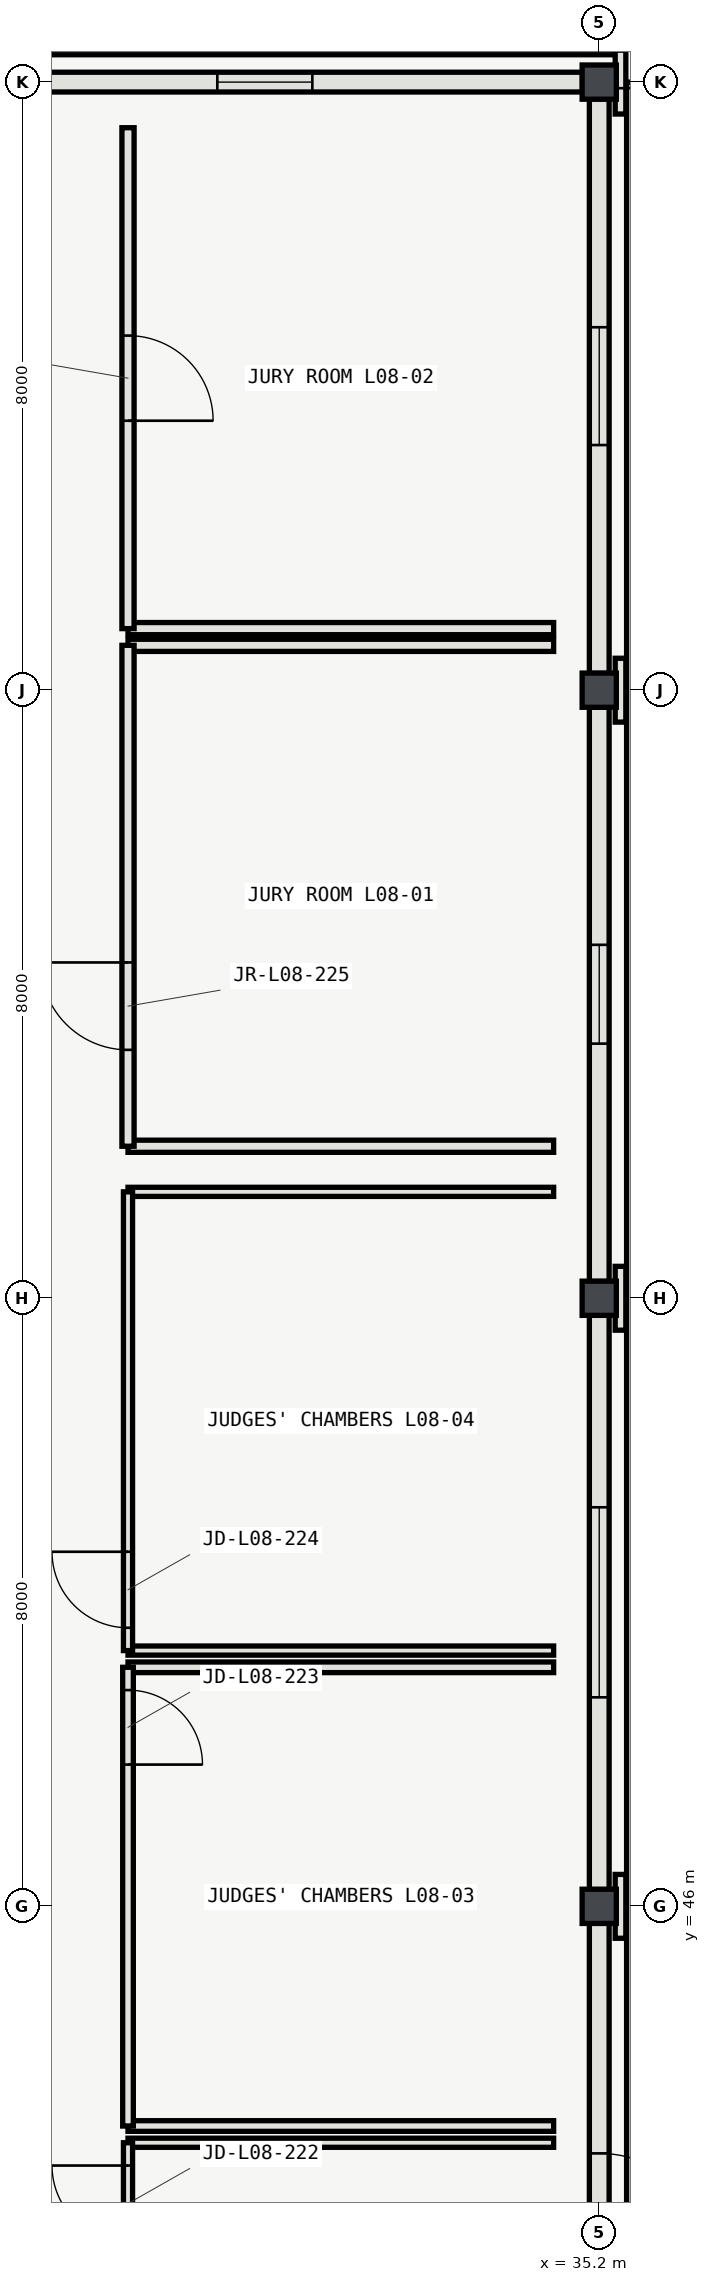
"""IFC4 building model, lengths in metres.
Left out: names, types, materials, properties, quantities, classifications, styles, units other than length and angle.
Written with IfcOpenShell. Run it as: python <this file> out.ifc"""

import sys

from ifc_helpers import new_model, si_unit, direction, frame, frame_2d, origin, origin_2d, place, context, subcontext, project, spatial, rectangle, hollow_rectangle, extrude, element, fill, save


model = new_model("IFC4")
c1 = context("Model", 3, precision=1e-05, world=origin(), true_north=direction((0.0, 1.0)))
c2 = subcontext(c1, "Body", "Model", "MODEL_VIEW")
j1 = project(units=[si_unit("LENGTHUNIT", "METRE"), si_unit("PLANEANGLEUNIT", "RADIAN")], contexts=[c1])
p1 = place(None, origin())
s1 = spatial("IfcSite", under=j1, at=p1, CompositionType="ELEMENT")
p2 = place(p1, origin())
s2 = spatial("IfcBuilding", under=s1, at=p2, CompositionType="ELEMENT")
p3 = place(p2, frame((0.0, 0.0, 37.2)))
s3 = spatial("IfcBuildingStorey", under=s2, at=p3, CompositionType="ELEMENT", Elevation=37.2)
for number, where, z_axis, x_axis in (
    (1, (35.2, 46.0, 0.0), (0.0, 0.0, 1.0), (1.0, 0.0, 0.0)),
    (2, (35.2, 54.0, 0.0), (0.0, 0.0, 1.0), (1.0, 0.0, 0.0)),
    (3, (35.2, 62.0, 0.0), (0.0, 0.0, 1.0), (1.0, 0.0, 0.0)),
    (4, (35.2, 70.0, 0.0), (0.0, 0.0, 1.0), (1.0, 0.0, 0.0)),
):
    element("IfcColumn", number, at=place(p3, frame(where, z_axis=z_axis, x_axis=x_axis)), inside=s3, PredefinedType="COLUMN", context=c2, shape_type="SweptSolid", body=[
        extrude(hollow_rectangle(XDim=0.45, YDim=0.45, WallThickness=0.018, InnerFilletRadius=0.018, OuterFilletRadius=0.036, at=origin_2d()), origin(), (0.0, 0.0, 1.0), 4.2),
    ])
p4 = place(p3, frame((34.979, 70.0, 0.0), z_axis=(0.0, 0.0, 1.0), x_axis=(-1.0, 0.0, 0.0)))
e5 = element("IfcWall", 5, at=p4, inside=s3, PredefinedType="SOLIDWALL", context=c2, shape_type="SweptSolid", body=[
    extrude(rectangle(XDim=8.283, YDim=0.26, at=frame_2d((4.142, 0.0))), origin(), (0.0, 0.0, 1.0), 3.483),
])
p5 = place(p4, frame((3.554, 0.0, 0.95)))
e6 = element("IfcOpeningElement", 6, at=p5, cuts=e5, PredefinedType="OPENING", context=c2, shape_type="SweptSolid", body=[
    extrude(rectangle(XDim=1.25, YDim=1.6, at=frame_2d((0.625, 0.8))), frame((0.0, 0.14, 0.0), z_axis=(0.0, -1.0, 0.0), x_axis=(1.0, 0.0, 0.0)), (0.0, 0.0, 1.0), 0.28),
])
p6 = place(p3, frame((35.2, 38.221, 0.0), z_axis=(0.0, 0.0, 1.0), x_axis=(0.0, 1.0, 0.0)))
e7 = element("IfcWall", 7, at=p6, inside=s3, PredefinedType="SOLIDWALL", context=c2, shape_type="SweptSolid", body=[
    extrude(rectangle(XDim=7.558, YDim=0.26, at=frame_2d((3.779, 0.0))), origin(), (0.0, 0.0, 1.0), 3.483),
])
p7 = place(p6, frame((3.029, 0.0, 0.0)))
e8 = element("IfcOpeningElement", 8, at=p7, cuts=e7, PredefinedType="OPENING", context=c2, shape_type="SweptSolid", body=[
    extrude(rectangle(XDim=1.5, YDim=2.2, at=frame_2d((0.75, 1.1))), frame((0.0, 0.14, 0.0), z_axis=(0.0, -1.0, 0.0), x_axis=(1.0, 0.0, 0.0)), (0.0, 0.0, 1.0), 0.28),
])
p8 = place(p3, frame((35.2, 46.221, 0.0), z_axis=(0.0, 0.0, 1.0), x_axis=(0.0, 1.0, 0.0)))
e9 = element("IfcWall", 9, at=p8, inside=s3, PredefinedType="SOLIDWALL", context=c2, shape_type="SweptSolid", body=[
    extrude(rectangle(XDim=7.558, YDim=0.26, at=frame_2d((3.779, 0.0))), origin(), (0.0, 0.0, 1.0), 3.483),
])
p9 = place(p8, frame((2.529, 0.0, 0.95)))
e10 = element("IfcOpeningElement", 10, at=p9, cuts=e9, PredefinedType="OPENING", context=c2, shape_type="SweptSolid", body=[
    extrude(rectangle(XDim=2.5, YDim=1.6, at=frame_2d((1.25, 0.8))), frame((0.0, 0.14, 0.0), z_axis=(0.0, -1.0, 0.0), x_axis=(1.0, 0.0, 0.0)), (0.0, 0.0, 1.0), 0.28),
])
p10 = place(p3, frame((35.2, 54.221, 0.0), z_axis=(0.0, 0.0, 1.0), x_axis=(0.0, 1.0, 0.0)))
e11 = element("IfcWall", 11, at=p10, inside=s3, PredefinedType="SOLIDWALL", context=c2, shape_type="SweptSolid", body=[
    extrude(rectangle(XDim=7.558, YDim=0.26, at=frame_2d((3.779, 0.0))), origin(), (0.0, 0.0, 1.0), 3.483),
])
p11 = place(p10, frame((3.129, 0.0, 0.95)))
e12 = element("IfcOpeningElement", 12, at=p11, cuts=e11, PredefinedType="OPENING", context=c2, shape_type="SweptSolid", body=[
    extrude(rectangle(XDim=1.3, YDim=1.95, at=frame_2d((0.65, 0.975))), frame((0.0, 0.14, 0.0), z_axis=(0.0, -1.0, 0.0), x_axis=(1.0, 0.0, 0.0)), (0.0, 0.0, 1.0), 0.28),
])
p12 = place(p3, frame((35.2, 62.221, 0.0), z_axis=(0.0, 0.0, 1.0), x_axis=(0.0, 1.0, 0.0)))
e13 = element("IfcWall", 13, at=p12, inside=s3, PredefinedType="SOLIDWALL", context=c2, shape_type="SweptSolid", body=[
    extrude(rectangle(XDim=7.558, YDim=0.26, at=frame_2d((3.779, 0.0))), origin(), (0.0, 0.0, 1.0), 3.483),
])
p13 = place(p12, frame((3.004, 0.0, 0.95)))
e14 = element("IfcOpeningElement", 14, at=p13, cuts=e13, PredefinedType="OPENING", context=c2, shape_type="SweptSolid", body=[
    extrude(rectangle(XDim=1.55, YDim=1.95, at=frame_2d((0.775, 0.975))), frame((0.0, 0.14, 0.0), z_axis=(0.0, -1.0, 0.0), x_axis=(1.0, 0.0, 0.0)), (0.0, 0.0, 1.0), 0.28),
])
p14 = place(p3, frame((35.64, 30.0, 0.0), z_axis=(0.0, 0.0, 1.0), x_axis=(0.0, 1.0, 0.0)))
e15 = element("IfcWall", 15, at=p14, inside=s3, PredefinedType="SOLIDWALL", context=c2, shape_type="SweptSolid", body=[
    extrude(rectangle(XDim=40.0, YDim=0.16, at=frame_2d((20.0, 0.0))), origin(), (0.0, 0.0, 1.0), 0.58),
])
p15 = place(p3, frame((35.54, 70.44, 0.0), z_axis=(0.0, 0.0, 1.0), x_axis=(-1.0, 0.0, 0.0)))
e16 = element("IfcWall", 16, at=p15, inside=s3, PredefinedType="SOLIDWALL", context=c2, shape_type="SweptSolid", body=[
    extrude(rectangle(XDim=35.88, YDim=0.16, at=frame_2d((17.94, 0.0))), origin(), (0.0, 0.0, 1.0), 0.58),
])
for number, where, z_axis, x_axis in (
    (17, (35.48, 45.58, 0.0), (0.0, 0.0, 1.0), (0.0, 1.0, 0.0)),
    (18, (35.48, 53.58, 0.0), (0.0, 0.0, 1.0), (0.0, 1.0, 0.0)),
    (19, (35.48, 61.58, 0.0), (0.0, 0.0, 1.0), (0.0, 1.0, 0.0)),
    (20, (35.48, 69.58, 0.0), (0.0, 0.0, 1.0), (0.0, 1.0, 0.0)),
):
    element("IfcWall", number, at=place(p3, frame(where, z_axis=z_axis, x_axis=x_axis)), inside=s3, PredefinedType="SOLIDWALL", context=c2, shape_type="SweptSolid", body=[
        extrude(rectangle(XDim=0.84, YDim=0.14, at=frame_2d((0.42, 0.0))), origin(), (0.0, 0.0, 1.0), 3.94),
    ])
p16 = place(p3, frame((34.6, 42.89, 0.0), z_axis=(0.0, 0.0, 1.0), x_axis=(-1.0, 0.0, 0.0)))
e21 = element("IfcWall", 21, at=p16, inside=s3, PredefinedType="PARTITIONING", context=c2, shape_type="SweptSolid", body=[
    extrude(rectangle(XDim=5.6, YDim=0.12, at=frame_2d((2.8, 0.0))), origin(), (0.0, 0.0, 1.0), 3.92),
])
p17 = place(p3, frame((29.0, 42.89, 0.0), z_axis=(0.0, 0.0, 1.0), x_axis=(0.0, -1.0, 0.0)))
e22 = element("IfcWall", 22, at=p17, inside=s3, PredefinedType="PARTITIONING", context=c2, shape_type="SweptSolid", body=[
    extrude(rectangle(XDim=6.035, YDim=0.12, at=frame_2d((3.018, 0.0))), origin(), (0.0, 0.0, 1.0), 3.92),
])
p18 = place(p17, frame((0.3, 0.0, 0.0)))
e23 = element("IfcOpeningElement", 23, at=p18, cuts=e22, PredefinedType="OPENING", context=c2, shape_type="SweptSolid", body=[
    extrude(rectangle(XDim=1.0, YDim=2.15, at=frame_2d((0.5, 1.075))), frame((0.0, 0.07, 0.0), z_axis=(0.0, -1.0, 0.0), x_axis=(1.0, 0.0, 0.0)), (0.0, 0.0, 1.0), 0.14),
])
for number, where, z_axis, x_axis in (
    (24, (29.0, 43.11, 0.0), (0.0, 0.0, 1.0), (1.0, 0.0, 0.0)),
    (25, (34.6, 49.145, 0.0), (0.0, 0.0, 1.0), (-1.0, 0.0, 0.0)),
):
    element("IfcWall", number, at=place(p3, frame(where, z_axis=z_axis, x_axis=x_axis)), inside=s3, PredefinedType="PARTITIONING", context=c2, shape_type="SweptSolid", body=[
        extrude(rectangle(XDim=5.6, YDim=0.14, at=frame_2d((2.8, 0.0))), origin(), (0.0, 0.0, 1.0), 3.92),
    ])
p19 = place(p3, frame((29.0, 49.145, 0.0), z_axis=(0.0, 0.0, 1.0), x_axis=(0.0, -1.0, 0.0)))
e26 = element("IfcWall", 26, at=p19, inside=s3, PredefinedType="PARTITIONING", context=c2, shape_type="SweptSolid", body=[
    extrude(rectangle(XDim=6.035, YDim=0.14, at=frame_2d((3.018, 0.0))), origin(), (0.0, 0.0, 1.0), 3.92),
])
p20 = place(p19, frame((0.3, 0.0, 0.0)))
e27 = element("IfcOpeningElement", 27, at=p20, cuts=e26, PredefinedType="OPENING", context=c2, shape_type="SweptSolid", body=[
    extrude(rectangle(XDim=0.98, YDim=2.15, at=frame_2d((0.49, 1.075))), frame((0.0, 0.08, 0.0), z_axis=(0.0, -1.0, 0.0), x_axis=(1.0, 0.0, 0.0)), (0.0, 0.0, 1.0), 0.16),
])
for number, where, z_axis, x_axis in (
    (28, (29.0, 49.365, 0.0), (0.0, 0.0, 1.0), (1.0, 0.0, 0.0)),
    (29, (34.6, 55.4, 0.0), (0.0, 0.0, 1.0), (-1.0, 0.0, 0.0)),
):
    element("IfcWall", number, at=place(p3, frame(where, z_axis=z_axis, x_axis=x_axis)), inside=s3, PredefinedType="PARTITIONING", context=c2, shape_type="SweptSolid", body=[
        extrude(rectangle(XDim=5.6, YDim=0.12, at=frame_2d((2.8, 0.0))), origin(), (0.0, 0.0, 1.0), 3.92),
    ])
p21 = place(p3, frame((29.0, 55.4, 0.0), z_axis=(0.0, 0.0, 1.0), x_axis=(0.0, -1.0, 0.0)))
e30 = element("IfcWall", 30, at=p21, inside=s3, PredefinedType="PARTITIONING", context=c2, shape_type="SweptSolid", body=[
    extrude(rectangle(XDim=6.035, YDim=0.12, at=frame_2d((3.018, 0.0))), origin(), (0.0, 0.0, 1.0), 3.92),
])
p22 = place(p21, frame((4.735, 0.0, 0.0)))
e31 = element("IfcOpeningElement", 31, at=p22, cuts=e30, PredefinedType="OPENING", context=c2, shape_type="SweptSolid", body=[
    extrude(rectangle(XDim=1.0, YDim=2.2, at=frame_2d((0.5, 1.1))), frame((0.0, 0.07, 0.0), z_axis=(0.0, -1.0, 0.0), x_axis=(1.0, 0.0, 0.0)), (0.0, 0.0, 1.0), 0.14),
])
for number, where, z_axis, x_axis in (
    (32, (29.0, 56.0, 0.0), (0.0, 0.0, 1.0), (1.0, 0.0, 0.0)),
    (33, (34.6, 62.59, 0.0), (0.0, 0.0, 1.0), (-1.0, 0.0, 0.0)),
):
    element("IfcWall", number, at=place(p3, frame(where, z_axis=z_axis, x_axis=x_axis)), inside=s3, PredefinedType="PARTITIONING", context=c2, shape_type="SweptSolid", body=[
        extrude(rectangle(XDim=5.6, YDim=0.16, at=frame_2d((2.8, 0.0))), origin(), (0.0, 0.0, 1.0), 3.92),
    ])
p23 = place(p3, frame((29.0, 62.59, 0.0), z_axis=(0.0, 0.0, 1.0), x_axis=(0.0, -1.0, 0.0)))
e34 = element("IfcWall", 34, at=p23, inside=s3, PredefinedType="PARTITIONING", context=c2, shape_type="SweptSolid", body=[
    extrude(rectangle(XDim=6.59, YDim=0.16, at=frame_2d((3.295, 0.0))), origin(), (0.0, 0.0, 1.0), 3.92),
])
p24 = place(p23, frame((4.172, 0.0, 0.0)))
e35 = element("IfcOpeningElement", 35, at=p24, cuts=e34, PredefinedType="OPENING", context=c2, shape_type="SweptSolid", body=[
    extrude(rectangle(XDim=1.15, YDim=2.2, at=frame_2d((0.575, 1.1))), frame((0.0, 0.09, 0.0), z_axis=(0.0, -1.0, 0.0), x_axis=(1.0, 0.0, 0.0)), (0.0, 0.0, 1.0), 0.18),
])
p25 = place(p3, frame((29.0, 62.81, 0.0), z_axis=(0.0, 0.0, 1.0), x_axis=(1.0, 0.0, 0.0)))
e36 = element("IfcWall", 36, at=p25, inside=s3, PredefinedType="PARTITIONING", context=c2, shape_type="SweptSolid", body=[
    extrude(rectangle(XDim=5.6, YDim=0.16, at=frame_2d((2.8, 0.0))), origin(), (0.0, 0.0, 1.0), 3.92),
])
p26 = place(p3, frame((29.0, 69.4, 0.0), z_axis=(0.0, 0.0, 1.0), x_axis=(0.0, -1.0, 0.0)))
e37 = element("IfcWall", 37, at=p26, inside=s3, PredefinedType="PARTITIONING", context=c2, shape_type="SweptSolid", body=[
    extrude(rectangle(XDim=6.59, YDim=0.16, at=frame_2d((3.295, 0.0))), origin(), (0.0, 0.0, 1.0), 3.92),
])
p27 = place(p26, frame((2.735, 0.0, 0.0)))
e38 = element("IfcOpeningElement", 38, at=p27, cuts=e37, PredefinedType="OPENING", context=c2, shape_type="SweptSolid", body=[
    extrude(rectangle(XDim=1.12, YDim=2.2, at=frame_2d((0.56, 1.1))), frame((0.0, 0.09, 0.0), z_axis=(0.0, -1.0, 0.0), x_axis=(1.0, 0.0, 0.0)), (0.0, 0.0, 1.0), 0.18),
])
p28 = place(p5, origin())
e39 = element("IfcWindow", 39, at=p28, inside=s3, PartitioningType="SINGLE_PANEL", PredefinedType="WINDOW", context=c2, shape_type="SweptSolid", body=[
    extrude(rectangle(XDim=1.25, YDim=1.6, at=frame_2d((0.625, 0.8))), frame((0.0, 0.03, 0.0), z_axis=(0.0, -1.0, 0.0), x_axis=(1.0, 0.0, 0.0)), (0.0, 0.0, 1.0), 0.06),
])
fill(e6, e39)
p29 = place(p7, origin())
e40 = element("IfcDoor", 40, at=p29, inside=s3, OperationType="SINGLE_SWING_LEFT", PredefinedType="DOOR", context=c2, shape_type="SweptSolid", body=[
    extrude(rectangle(XDim=1.5, YDim=2.2, at=frame_2d((0.75, 1.1))), frame((0.0, 0.025, 0.0), z_axis=(0.0, -1.0, 0.0), x_axis=(1.0, 0.0, 0.0)), (0.0, 0.0, 1.0), 0.05),
])
fill(e8, e40)
p30 = place(p9, origin())
e41 = element("IfcWindow", 41, at=p30, inside=s3, PartitioningType="SINGLE_PANEL", PredefinedType="WINDOW", context=c2, shape_type="SweptSolid", body=[
    extrude(rectangle(XDim=2.5, YDim=1.6, at=frame_2d((1.25, 0.8))), frame((0.0, 0.03, 0.0), z_axis=(0.0, -1.0, 0.0), x_axis=(1.0, 0.0, 0.0)), (0.0, 0.0, 1.0), 0.06),
])
fill(e10, e41)
p31 = place(p11, origin())
e42 = element("IfcWindow", 42, at=p31, inside=s3, PartitioningType="SINGLE_PANEL", PredefinedType="WINDOW", context=c2, shape_type="SweptSolid", body=[
    extrude(rectangle(XDim=1.3, YDim=1.95, at=frame_2d((0.65, 0.975))), frame((0.0, 0.03, 0.0), z_axis=(0.0, -1.0, 0.0), x_axis=(1.0, 0.0, 0.0)), (0.0, 0.0, 1.0), 0.06),
])
fill(e12, e42)
p32 = place(p13, origin())
e43 = element("IfcWindow", 43, at=p32, inside=s3, PartitioningType="SINGLE_PANEL", PredefinedType="WINDOW", context=c2, shape_type="SweptSolid", body=[
    extrude(rectangle(XDim=1.55, YDim=1.95, at=frame_2d((0.775, 0.975))), frame((0.0, 0.03, 0.0), z_axis=(0.0, -1.0, 0.0), x_axis=(1.0, 0.0, 0.0)), (0.0, 0.0, 1.0), 0.06),
])
fill(e14, e43)
p33 = place(p18, origin())
e44 = element("IfcDoor", 44, at=p33, inside=s3, OperationType="SINGLE_SWING_LEFT", PredefinedType="DOOR", context=c2, shape_type="SweptSolid", body=[
    extrude(rectangle(XDim=1.0, YDim=2.15, at=frame_2d((0.5, 1.075))), frame((0.0, 0.025, 0.0), z_axis=(0.0, -1.0, 0.0), x_axis=(1.0, 0.0, 0.0)), (0.0, 0.0, 1.0), 0.05),
])
fill(e23, e44)
p34 = place(p20, origin())
e45 = element("IfcDoor", 45, at=p34, inside=s3, OperationType="SINGLE_SWING_RIGHT", PredefinedType="DOOR", context=c2, shape_type="SweptSolid", body=[
    extrude(rectangle(XDim=0.98, YDim=2.15, at=frame_2d((0.49, 1.075))), frame((0.0, 0.025, 0.0), z_axis=(0.0, -1.0, 0.0), x_axis=(1.0, 0.0, 0.0)), (0.0, 0.0, 1.0), 0.05),
])
fill(e27, e45)
p35 = place(p22, origin())
e46 = element("IfcDoor", 46, at=p35, inside=s3, OperationType="SINGLE_SWING_LEFT", PredefinedType="DOOR", context=c2, shape_type="SweptSolid", body=[
    extrude(rectangle(XDim=1.0, YDim=2.2, at=frame_2d((0.5, 1.1))), frame((0.0, 0.025, 0.0), z_axis=(0.0, -1.0, 0.0), x_axis=(1.0, 0.0, 0.0)), (0.0, 0.0, 1.0), 0.05),
])
fill(e31, e46)
p36 = place(p24, origin())
e47 = element("IfcDoor", 47, at=p36, inside=s3, OperationType="SINGLE_SWING_LEFT", PredefinedType="DOOR", context=c2, shape_type="SweptSolid", body=[
    extrude(rectangle(XDim=1.15, YDim=2.2, at=frame_2d((0.575, 1.1))), frame((0.0, 0.025, 0.0), z_axis=(0.0, -1.0, 0.0), x_axis=(1.0, 0.0, 0.0)), (0.0, 0.0, 1.0), 0.05),
])
fill(e35, e47)
p37 = place(p27, origin())
e48 = element("IfcDoor", 48, at=p37, inside=s3, OperationType="SINGLE_SWING_RIGHT", PredefinedType="DOOR", context=c2, shape_type="SweptSolid", body=[
    extrude(rectangle(XDim=1.12, YDim=2.2, at=frame_2d((0.56, 1.1))), frame((0.0, 0.025, 0.0), z_axis=(0.0, -1.0, 0.0), x_axis=(1.0, 0.0, 0.0)), (0.0, 0.0, 1.0), 0.05),
])
fill(e38, e48)
save(model, sys.argv[1])
